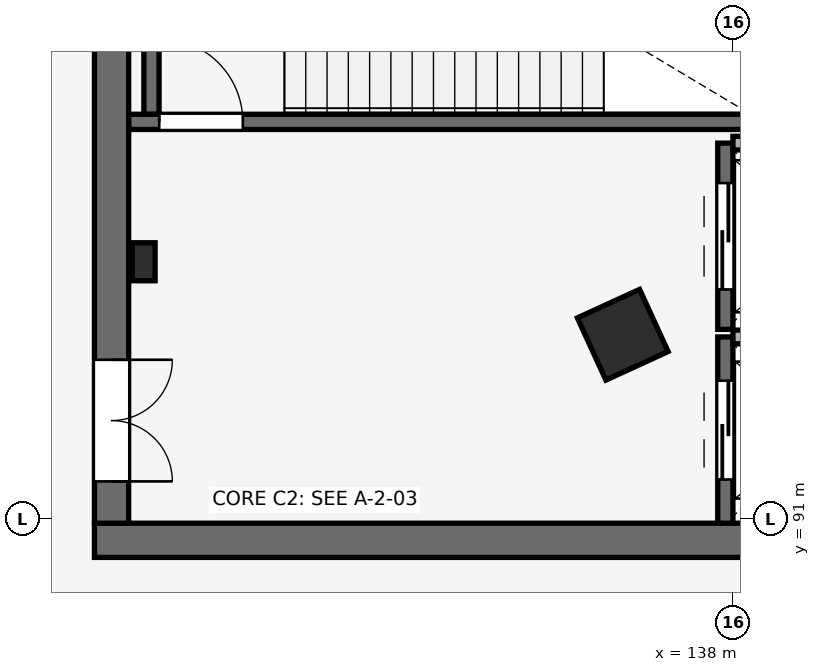
"""IFC4 building model, lengths in metres.
Left out: names, types, materials, properties, quantities, classifications, styles, units other than length and angle.
Written with IfcOpenShell. Run it as: python <this file> out.ifc"""

import sys

from ifc_helpers import new_model, si_unit, direction, frame, frame_2d, origin, origin_2d, place, context, subcontext, project, spatial, rectangle, i_section, extrude, element, fill, save


model = new_model("IFC4")
c1 = context("Model", 3, precision=1e-05, world=origin(), true_north=direction((0.0, 1.0)))
c2 = subcontext(c1, "Body", "Model", "MODEL_VIEW")
j1 = project(units=[si_unit("LENGTHUNIT", "METRE"), si_unit("PLANEANGLEUNIT", "RADIAN")], contexts=[c1])
p1 = place(None, origin())
s1 = spatial("IfcSite", under=j1, at=p1, CompositionType="ELEMENT")
p2 = place(p1, origin())
s2 = spatial("IfcBuilding", under=s1, at=p2, CompositionType="ELEMENT")
p3 = place(p2, origin())
s3 = spatial("IfcBuildingStorey", under=s2, at=p3, CompositionType="ELEMENT", Elevation=0.0)
p4 = place(p3, frame((136.55, 93.43, 0.0), z_axis=(0.0, 0.0, 1.0), x_axis=(0.909018020308, 0.416756810089, 0.0)))
e1 = element("IfcColumn", 1, at=p4, inside=s3, PredefinedType="COLUMN", context=c2, shape_type="SweptSolid", body=[
    extrude(rectangle(XDim=0.9, YDim=0.9, at=origin_2d()), origin(), (0.0, 0.0, 1.0), 5.4),
])
p5 = place(p3, frame((129.6, 90.725, 0.0), z_axis=(0.0, 0.0, 1.0), x_axis=(1.0, 0.0, 0.0)))
e2 = element("IfcWall", 2, at=p5, inside=s3, PredefinedType="SHEAR", context=c2, shape_type="SweptSolid", body=[
    extrude(rectangle(XDim=11.4, YDim=0.45, at=frame_2d((5.7, 0.0))), origin(), (0.0, 0.0, 1.0), 5.4),
])
p6 = place(p3, frame((129.825, 90.95, 0.0), z_axis=(0.0, 0.0, 1.0), x_axis=(0.0, 1.0, 0.0)))
e3 = element("IfcWall", 3, at=p6, inside=s3, PredefinedType="SHEAR", context=c2, shape_type="SweptSolid", body=[
    extrude(rectangle(XDim=9.1, YDim=0.45, at=frame_2d((4.55, 0.0))), origin(), (0.0, 0.0, 1.0), 5.4),
])
p7 = place(p6, frame((0.55, 0.0, 0.0)))
e4 = element("IfcOpeningElement", 4, at=p7, cuts=e3, PredefinedType="OPENING", context=c2, shape_type="SweptSolid", body=[
    extrude(rectangle(XDim=1.6, YDim=2.2, at=frame_2d((0.8, 1.1))), frame((0.0, 0.235, 0.0), z_axis=(0.0, -1.0, 0.0), x_axis=(1.0, 0.0, 0.0)), (0.0, 0.0, 1.0), 0.47),
])
p8 = place(p3, frame((130.248, 94.389, 0.0), z_axis=(0.0, 0.0, 1.0), x_axis=(1.0, 0.0, 0.0)))
e5 = element("IfcColumn", 5, at=p8, inside=s3, PredefinedType="COLUMN", context=c2, shape_type="SweptSolid", body=[
    extrude(i_section(OverallWidth=0.3, OverallDepth=0.5, WebThickness=0.014, FlangeThickness=0.028, FilletRadius=0.027, at=origin_2d()), origin(), (0.0, 0.0, 1.0), 5.4),
])
p9 = place(p3, frame((137.9, 90.95, 0.0), z_axis=(0.0, 0.0, 1.0), x_axis=(0.0, 1.0, 0.0)))
e6 = element("IfcWall", 6, at=p9, inside=s3, PredefinedType="SHEAR", context=c2, shape_type="SweptSolid", body=[
    extrude(rectangle(XDim=2.45, YDim=0.2, at=frame_2d((1.225, 0.0))), origin(), (0.0, 0.0, 1.0), 5.12),
])
p10 = place(p9, frame((0.575, 0.0, 0.0)))
e7 = element("IfcOpeningElement", 7, at=p10, cuts=e6, PredefinedType="OPENING", context=c2, shape_type="SweptSolid", body=[
    extrude(rectangle(XDim=1.3, YDim=2.2, at=frame_2d((0.65, 1.1))), frame((0.0, 0.11, 0.0), z_axis=(0.0, -1.0, 0.0), x_axis=(1.0, 0.0, 0.0)), (0.0, 0.0, 1.0), 0.22),
])
p11 = place(p3, frame((138.0, 93.4, 0.0), z_axis=(0.0, 0.0, 1.0), x_axis=(1.0, 0.0, 0.0)))
e8 = element("IfcWall", 8, at=p11, inside=s3, PredefinedType="PARTITIONING", context=c2, shape_type="SweptSolid", body=[
    extrude(rectangle(XDim=2.45, YDim=0.18, at=frame_2d((1.225, 0.0))), origin(), (0.0, 0.0, 1.0), 5.4),
])
p12 = place(p3, frame((137.9, 93.5, 0.0), z_axis=(0.0, 0.0, 1.0), x_axis=(0.0, 1.0, 0.0)))
e9 = element("IfcWall", 9, at=p12, inside=s3, PredefinedType="SHEAR", context=c2, shape_type="SweptSolid", body=[
    extrude(rectangle(XDim=2.45, YDim=0.2, at=frame_2d((1.225, 0.0))), origin(), (0.0, 0.0, 1.0), 5.12),
])
p13 = place(p12, frame((0.525, 0.0, 0.0)))
e10 = element("IfcOpeningElement", 10, at=p13, cuts=e9, PredefinedType="OPENING", context=c2, shape_type="SweptSolid", body=[
    extrude(rectangle(XDim=1.4, YDim=2.2, at=frame_2d((0.7, 1.1))), frame((0.0, 0.11, 0.0), z_axis=(0.0, -1.0, 0.0), x_axis=(1.0, 0.0, 0.0)), (0.0, 0.0, 1.0), 0.22),
])
p14 = place(p3, frame((138.0, 95.95, 0.0), z_axis=(0.0, 0.0, 1.0), x_axis=(1.0, 0.0, 0.0)))
e11 = element("IfcWall", 11, at=p14, inside=s3, PredefinedType="PARTITIONING", context=c2, shape_type="SweptSolid", body=[
    extrude(rectangle(XDim=2.45, YDim=0.18, at=frame_2d((1.225, 0.0))), origin(), (0.0, 0.0, 1.0), 5.4),
])
p15 = place(p3, frame((130.052, 96.23, 0.0), z_axis=(0.0, 0.0, 1.0), x_axis=(1.0, 0.0, 0.0)))
e12 = element("IfcWall", 12, at=p15, inside=s3, PredefinedType="SHEAR", context=c2, shape_type="SweptSolid", body=[
    extrude(rectangle(XDim=8.248, YDim=0.2, at=frame_2d((4.124, 0.0))), origin(), (0.0, 0.0, 1.0), 5.4),
])
p16 = place(p15, frame((0.4, 0.0, 0.0)))
e13 = element("IfcOpeningElement", 13, at=p16, cuts=e12, PredefinedType="OPENING", context=c2, shape_type="SweptSolid", body=[
    extrude(rectangle(XDim=1.1, YDim=2.15, at=frame_2d((0.55, 1.075))), frame((0.0, 0.11, 0.0), z_axis=(0.0, -1.0, 0.0), x_axis=(1.0, 0.0, 0.0)), (0.0, 0.0, 1.0), 0.22),
])
p17 = place(p3, frame((130.35, 96.332, 0.0), z_axis=(0.0, 0.0, 1.0), x_axis=(0.0, 1.0, 0.0)))
e14 = element("IfcWall", 14, at=p17, inside=s3, PredefinedType="SHEAR", context=c2, shape_type="SweptSolid", body=[
    extrude(rectangle(XDim=3.686, YDim=0.2, at=frame_2d((1.843, 0.0))), origin(), (0.0, 0.0, 1.0), 5.4),
])
p18 = place(p10, origin())
e15 = element("IfcDoor", 15, at=p18, inside=s3, OperationType="DOUBLE_DOOR_SLIDING", PredefinedType="DOOR", context=c2, shape_type="SweptSolid", body=[
    extrude(rectangle(XDim=1.3, YDim=2.2, at=frame_2d((0.65, 1.1))), frame((0.0, 0.025, 0.0), z_axis=(0.0, -1.0, 0.0), x_axis=(1.0, 0.0, 0.0)), (0.0, 0.0, 1.0), 0.05),
])
fill(e7, e15)
p19 = place(p13, origin())
e16 = element("IfcDoor", 16, at=p19, inside=s3, OperationType="DOUBLE_DOOR_SLIDING", PredefinedType="DOOR", context=c2, shape_type="SweptSolid", body=[
    extrude(rectangle(XDim=1.4, YDim=2.2, at=frame_2d((0.7, 1.1))), frame((0.0, 0.025, 0.0), z_axis=(0.0, -1.0, 0.0), x_axis=(1.0, 0.0, 0.0)), (0.0, 0.0, 1.0), 0.05),
])
fill(e10, e16)
p20 = place(p16, frame((1.1, 0.0, 0.0), z_axis=(0.0, 0.0, 1.0), x_axis=(-1.0, 0.0, 0.0)))
e17 = element("IfcDoor", 17, at=p20, inside=s3, OperationType="SINGLE_SWING_RIGHT", PredefinedType="DOOR", context=c2, shape_type="SweptSolid", body=[
    extrude(rectangle(XDim=1.1, YDim=2.15, at=frame_2d((0.55, 1.075))), frame((0.0, 0.025, 0.0), z_axis=(0.0, -1.0, 0.0), x_axis=(1.0, 0.0, 0.0)), (0.0, 0.0, 1.0), 0.05),
])
fill(e13, e17)
p21 = place(p7, frame((1.6, 0.0, 0.0), z_axis=(0.0, 0.0, 1.0), x_axis=(-1.0, 0.0, 0.0)))
e18 = element("IfcDoor", 18, at=p21, inside=s3, OperationType="DOUBLE_DOOR_SINGLE_SWING", PredefinedType="DOOR", context=c2, shape_type="SweptSolid", body=[
    extrude(rectangle(XDim=1.6, YDim=2.2, at=frame_2d((0.8, 1.1))), frame((0.0, 0.025, 0.0), z_axis=(0.0, -1.0, 0.0), x_axis=(1.0, 0.0, 0.0)), (0.0, 0.0, 1.0), 0.05),
])
fill(e4, e18)
save(model, sys.argv[1])
